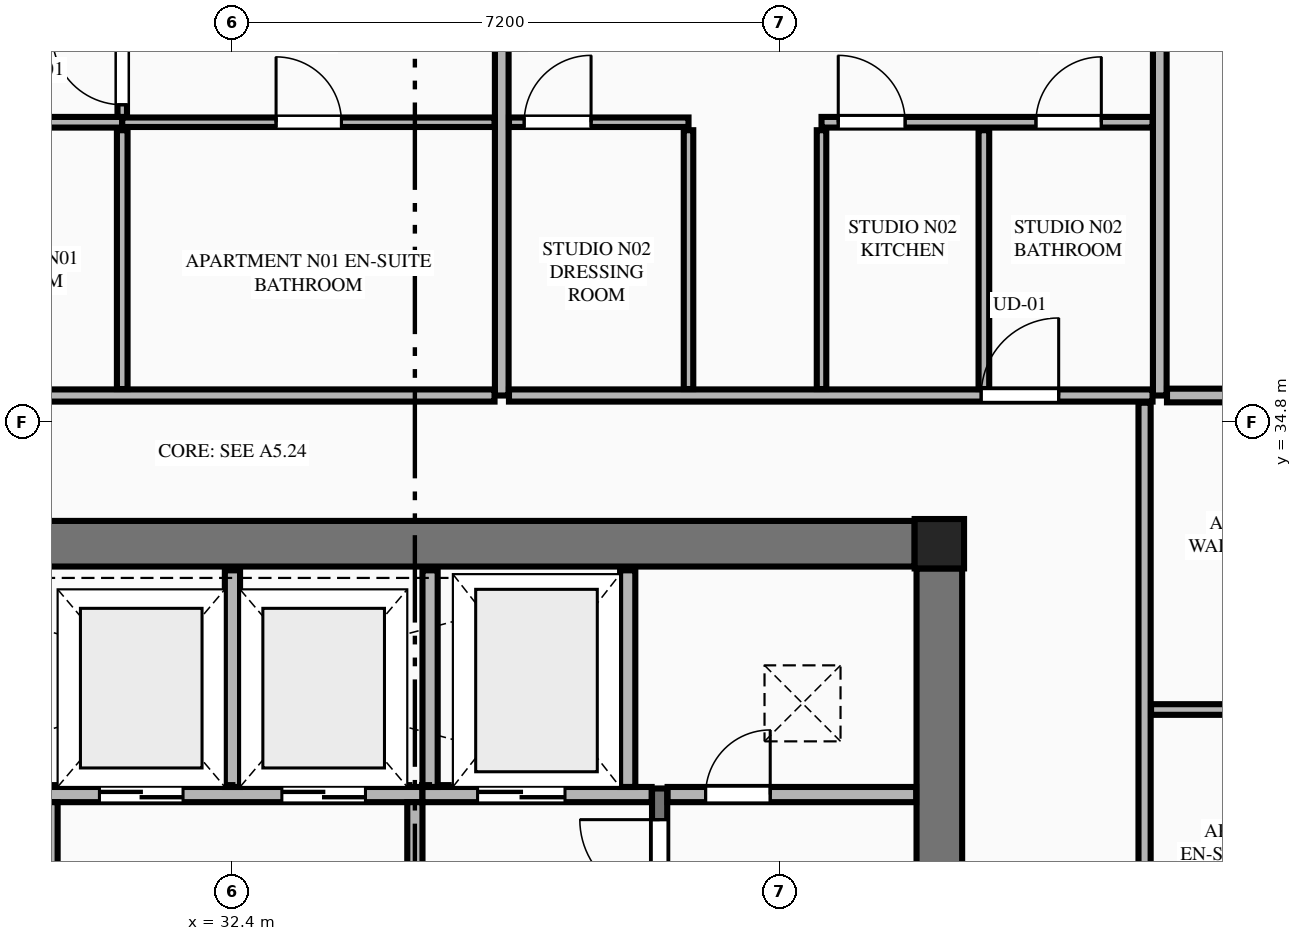
"""IFC4 building model, lengths in metres.
Left out: names, types, materials, properties, quantities, classifications, styles, units other than length and angle.
Written with IfcOpenShell. Run it as: python <this file> out.ifc"""

import sys

from ifc_helpers import new_model, si_unit, direction, frame, frame_2d, origin, origin_2d, place, context, subcontext, project, spatial, rectangle, extrude, element, fill, save


model = new_model("IFC4")
c1 = context("Model", 3, precision=1e-05, world=origin(), true_north=direction((0.0, 1.0)))
c2 = subcontext(c1, "Body", "Model", "MODEL_VIEW")
j1 = project(units=[si_unit("LENGTHUNIT", "METRE"), si_unit("PLANEANGLEUNIT", "RADIAN")], contexts=[c1])
p1 = place(None, origin())
s1 = spatial("IfcSite", under=j1, at=p1, CompositionType="ELEMENT")
p2 = place(p1, origin())
s2 = spatial("IfcBuilding", under=s1, at=p2, CompositionType="ELEMENT")
p3 = place(p2, frame((0.0, 0.0, 179.0)))
s3 = spatial("IfcBuildingStorey", under=s2, at=p3, CompositionType="ELEMENT", Elevation=179.0)
p4 = place(p3, frame((41.7, 33.2, 0.0), z_axis=(0.0, 0.0, 1.0), x_axis=(1.0, 0.0, 0.0)))
e1 = element("IfcColumn", 1, at=p4, inside=s3, PredefinedType="COLUMN", context=c2, shape_type="SweptSolid", body=[
    extrude(rectangle(XDim=0.65, YDim=0.65, at=origin_2d()), origin(), (0.0, 0.0, 1.0), 3.55),
])
p5 = place(p3, frame((23.425, 33.2, 0.0), z_axis=(0.0, 0.0, 1.0), x_axis=(1.0, 0.0, 0.0)))
e2 = element("IfcWall", 2, at=p5, inside=s3, PredefinedType="SHEAR", context=c2, shape_type="SweptSolid", body=[
    extrude(rectangle(XDim=17.95, YDim=0.6, at=frame_2d((8.975, 0.0))), origin(), (0.0, 0.0, 1.0), 3.35),
])
p6 = place(p3, frame((41.7, 18.925, 0.0), z_axis=(0.0, 0.0, 1.0), x_axis=(0.0, 1.0, 0.0)))
e3 = element("IfcWall", 3, at=p6, inside=s3, PredefinedType="SHEAR", context=c2, shape_type="SweptSolid", body=[
    extrude(rectangle(XDim=13.95, YDim=0.6, at=frame_2d((6.975, 0.0))), origin(), (0.0, 0.0, 1.0), 3.35),
])
p7 = place(p6, frame((2.915, 0.0, 0.0)))
e4 = element("IfcOpeningElement", 4, at=p7, cuts=e3, PredefinedType="OPENING", context=c2, shape_type="SweptSolid", body=[
    extrude(rectangle(XDim=1.22, YDim=2.25, at=frame_2d((0.61, 1.125))), frame((0.0, 0.31, 0.0), z_axis=(0.0, -1.0, 0.0), x_axis=(1.0, 0.0, 0.0)), (0.0, 0.0, 1.0), 0.62),
])
p8 = place(p3, frame((38.02, 23.2, 0.0), z_axis=(0.0, 0.0, 1.0), x_axis=(0.0, 1.0, 0.0)))
e5 = element("IfcWall", 5, at=p8, inside=s3, PredefinedType="SHEAR", context=c2, shape_type="SweptSolid", body=[
    extrude(rectangle(XDim=6.78, YDim=0.2, at=frame_2d((3.39, 0.0))), origin(), (0.0, 0.0, 1.0), 3.55),
])
p9 = place(p8, frame((5.32, 0.0, 0.0)))
e6 = element("IfcOpeningElement", 6, at=p9, cuts=e5, PredefinedType="OPENING", context=c2, shape_type="SweptSolid", body=[
    extrude(rectangle(XDim=1.05, YDim=2.15, at=frame_2d((0.525, 1.075))), frame((0.0, 0.11, 0.0), z_axis=(0.0, -1.0, 0.0), x_axis=(1.0, 0.0, 0.0)), (0.0, 0.0, 1.0), 0.22),
])
p10 = place(p3, frame((29.9, 29.9, 0.0), z_axis=(0.0, 0.0, 1.0), x_axis=(1.0, 0.0, 0.0)))
e7 = element("IfcWall", 7, at=p10, inside=s3, PredefinedType="PLUMBINGWALL", context=c2, shape_type="SweptSolid", body=[
    extrude(rectangle(XDim=5.0, YDim=0.2, at=frame_2d((2.5, 0.0))), origin(), (0.0, 0.0, 1.0), 3.35),
])
p11 = place(p10, frame((0.75, 0.0, 0.0)))
e8 = element("IfcOpeningElement", 8, at=p11, cuts=e7, PredefinedType="OPENING", context=c2, shape_type="SweptSolid", body=[
    extrude(rectangle(XDim=1.1, YDim=2.2, at=frame_2d((0.55, 1.1))), frame((0.0, 0.11, 0.0), z_axis=(0.0, -1.0, 0.0), x_axis=(1.0, 0.0, 0.0)), (0.0, 0.0, 1.0), 0.22),
])
p12 = place(p10, frame((3.15, 0.0, 0.0)))
e9 = element("IfcOpeningElement", 9, at=p12, cuts=e7, PredefinedType="OPENING", context=c2, shape_type="SweptSolid", body=[
    extrude(rectangle(XDim=1.1, YDim=2.2, at=frame_2d((0.55, 1.1))), frame((0.0, 0.11, 0.0), z_axis=(0.0, -1.0, 0.0), x_axis=(1.0, 0.0, 0.0)), (0.0, 0.0, 1.0), 0.22),
])
p13 = place(p3, frame((34.9, 29.9, 0.0), z_axis=(0.0, 0.0, 1.0), x_axis=(1.0, 0.0, 0.0)))
e10 = element("IfcWall", 10, at=p13, inside=s3, PredefinedType="PLUMBINGWALL", context=c2, shape_type="SweptSolid", body=[
    extrude(rectangle(XDim=3.015, YDim=0.2, at=frame_2d((1.508, 0.0))), origin(), (0.0, 0.0, 1.0), 3.35),
])
p14 = place(p13, frame((0.725, 0.0, 0.0)))
e11 = element("IfcOpeningElement", 11, at=p14, cuts=e10, PredefinedType="OPENING", context=c2, shape_type="SweptSolid", body=[
    extrude(rectangle(XDim=1.15, YDim=2.2, at=frame_2d((0.575, 1.1))), frame((0.0, 0.11, 0.0), z_axis=(0.0, -1.0, 0.0), x_axis=(1.0, 0.0, 0.0)), (0.0, 0.0, 1.0), 0.22),
])
p15 = place(p3, frame((38.125, 29.9, 0.0), z_axis=(0.0, 0.0, 1.0), x_axis=(1.0, 0.0, 0.0)))
e12 = element("IfcWall", 12, at=p15, inside=s3, PredefinedType="PLUMBINGWALL", context=c2, shape_type="SweptSolid", body=[
    extrude(rectangle(XDim=3.27, YDim=0.2, at=frame_2d((1.635, 0.0))), origin(), (0.0, 0.0, 1.0), 3.35),
])
p16 = place(p15, frame((0.5, 0.0, 0.0)))
e13 = element("IfcOpeningElement", 13, at=p16, cuts=e12, PredefinedType="OPENING", context=c2, shape_type="SweptSolid", body=[
    extrude(rectangle(XDim=0.85, YDim=2.05, at=frame_2d((0.425, 1.025))), frame((0.0, 0.11, 0.0), z_axis=(0.0, -1.0, 0.0), x_axis=(1.0, 0.0, 0.0)), (0.0, 0.0, 1.0), 0.22),
])
for number, where, z_axis, x_axis in (
    (14, (32.4, 30.0, 0.0), (0.0, 0.0, 1.0), (0.0, 1.0, 0.0)),
    (15, (35.0, 30.0, 0.0), (0.0, 0.0, 1.0), (0.0, 1.0, 0.0)),
    (16, (37.6, 30.0, 0.0), (0.0, 0.0, 1.0), (0.0, 1.0, 0.0)),
):
    element("IfcWall", number, at=place(p3, frame(where, z_axis=z_axis, x_axis=x_axis)), inside=s3, PredefinedType="PLUMBINGWALL", context=c2, shape_type="SweptSolid", body=[
        extrude(rectangle(XDim=2.85, YDim=0.2, at=frame_2d((1.425, 0.0))), origin(), (0.0, 0.0, 1.0), 3.35),
    ])
p17 = place(p3, frame((30.0, 27.05, 0.0), z_axis=(0.0, 0.0, 1.0), x_axis=(0.0, 1.0, 0.0)))
e17 = element("IfcWall", 17, at=p17, inside=s3, PredefinedType="PLUMBINGWALL", context=c2, shape_type="SweptSolid", body=[
    extrude(rectangle(XDim=2.75, YDim=0.2, at=frame_2d((1.375, 0.0))), origin(), (0.0, 0.0, 1.0), 3.35),
])
p18 = place(p17, frame((0.85, 0.0, 0.0)))
e18 = element("IfcOpeningElement", 18, at=p18, cuts=e17, PredefinedType="OPENING", context=c2, shape_type="SweptSolid", body=[
    extrude(rectangle(XDim=1.0, YDim=2.15, at=frame_2d((0.5, 1.075))), frame((0.0, 0.11, 0.0), z_axis=(0.0, -1.0, 0.0), x_axis=(1.0, 0.0, 0.0)), (0.0, 0.0, 1.0), 0.22),
])
p19 = place(p3, frame((34.8, 27.05, 0.0), z_axis=(0.0, 0.0, 1.0), x_axis=(0.0, 1.0, 0.0)))
e19 = element("IfcWall", 19, at=p19, inside=s3, PredefinedType="PLUMBINGWALL", context=c2, shape_type="SweptSolid", body=[
    extrude(rectangle(XDim=2.75, YDim=0.2, at=frame_2d((1.375, 0.0))), origin(), (0.0, 0.0, 1.0), 3.35),
])
p20 = place(p19, frame((0.85, 0.0, 0.0)))
e20 = element("IfcOpeningElement", 20, at=p20, cuts=e19, PredefinedType="OPENING", context=c2, shape_type="SweptSolid", body=[
    extrude(rectangle(XDim=1.0, YDim=2.15, at=frame_2d((0.5, 1.075))), frame((0.0, 0.11, 0.0), z_axis=(0.0, -1.0, 0.0), x_axis=(1.0, 0.0, 0.0)), (0.0, 0.0, 1.0), 0.22),
])
p21 = place(p3, frame((35.943, 35.15, 0.0), z_axis=(0.0, 0.0, 1.0), x_axis=(0.0, 1.0, 0.0)))
e21 = element("IfcWall", 21, at=p21, inside=s3, PredefinedType="PARTITIONING", context=c2, shape_type="SweptSolid", body=[
    extrude(rectangle(XDim=10.695, YDim=0.18, at=frame_2d((5.348, 0.0))), origin(), (0.0, 0.0, 1.0), 2.807),
])
p22 = place(p3, frame((44.6, 35.15, 0.0), z_axis=(0.0, 0.0, 1.0), x_axis=(0.0, 1.0, 0.0)))
e22 = element("IfcWall", 22, at=p22, inside=s3, PredefinedType="PARTITIONING", context=c2, shape_type="SweptSolid", body=[
    extrude(rectangle(XDim=10.482, YDim=0.18, at=frame_2d((5.241, 0.0))), origin(), (0.0, 0.0, 1.0), 3.35),
])
p23 = place(p3, frame((20.295, 35.15, 0.0), z_axis=(0.0, 0.0, 1.0), x_axis=(1.0, 0.0, 0.0)))
e23 = element("IfcWall", 23, at=p23, inside=s3, PredefinedType="PARTITIONING", context=c2, shape_type="SweptSolid", body=[
    extrude(rectangle(XDim=15.553, YDim=0.16, at=frame_2d((7.776, 0.0))), origin(), (0.0, 0.0, 1.0), 3.35),
])
p24 = place(p23, frame((0.405, 0.0, 0.0)))
e24 = element("IfcOpeningElement", 24, at=p24, cuts=e23, PredefinedType="OPENING", context=c2, shape_type="SweptSolid", body=[
    extrude(rectangle(XDim=1.02, YDim=2.25, at=frame_2d((0.51, 1.125))), frame((0.0, 0.09, 0.0), z_axis=(0.0, -1.0, 0.0), x_axis=(1.0, 0.0, 0.0)), (0.0, 0.0, 1.0), 0.18),
])
p25 = place(p3, frame((27.442, 38.745, 0.0), z_axis=(0.0, 0.0, 1.0), x_axis=(1.0, 0.0, 0.0)))
e25 = element("IfcWall", 25, at=p25, inside=s3, PredefinedType="PLUMBINGWALL", context=c2, shape_type="SweptSolid", body=[
    extrude(rectangle(XDim=3.508, YDim=0.14, at=frame_2d((1.754, 0.0))), origin(), (0.0, 0.0, 1.0), 3.35),
])
p26 = place(p25, frame((0.3, 0.0, 0.0)))
e26 = element("IfcOpeningElement", 26, at=p26, cuts=e25, PredefinedType="OPENING", context=c2, shape_type="SweptSolid", body=[
    extrude(rectangle(XDim=0.88, YDim=2.15, at=frame_2d((0.44, 1.075))), frame((0.0, 0.08, 0.0), z_axis=(0.0, -1.0, 0.0), x_axis=(1.0, 0.0, 0.0)), (0.0, 0.0, 1.0), 0.16),
])
p27 = place(p3, frame((30.95, 38.745, 0.0), z_axis=(0.0, 0.0, 1.0), x_axis=(1.0, 0.0, 0.0)))
e27 = element("IfcWall", 27, at=p27, inside=s3, PredefinedType="PARTITIONING", context=c2, shape_type="SweptSolid", body=[
    extrude(rectangle(XDim=4.898, YDim=0.125, at=frame_2d((2.449, 0.0))), origin(), (0.0, 0.0, 1.0), 3.35),
])
p28 = place(p27, frame((2.024, 0.0, 0.0)))
e28 = element("IfcOpeningElement", 28, at=p28, cuts=e27, PredefinedType="OPENING", context=c2, shape_type="SweptSolid", body=[
    extrude(rectangle(XDim=0.86, YDim=2.1, at=frame_2d((0.43, 1.05))), frame((0.0, 0.073, 0.0), z_axis=(0.0, -1.0, 0.0), x_axis=(1.0, 0.0, 0.0)), (0.0, 0.0, 1.0), 0.145),
])
p29 = place(p3, frame((30.95, 38.815, 0.0), z_axis=(0.0, 0.0, 1.0), x_axis=(0.0, 1.0, 0.0)))
e29 = element("IfcWall", 29, at=p29, inside=s3, PredefinedType="PARTITIONING", context=c2, shape_type="SweptSolid", body=[
    extrude(rectangle(XDim=1.33, YDim=0.125, at=frame_2d((0.665, 0.0))), origin(), (0.0, 0.0, 1.0), 3.35),
])
p30 = place(p29, frame((0.16, 0.0, 0.0)))
e30 = element("IfcOpeningElement", 30, at=p30, cuts=e29, PredefinedType="OPENING", context=c2, shape_type="SweptSolid", body=[
    extrude(rectangle(XDim=0.92, YDim=2.15, at=frame_2d((0.46, 1.075))), frame((0.0, 0.073, 0.0), z_axis=(0.0, -1.0, 0.0), x_axis=(1.0, 0.0, 0.0)), (0.0, 0.0, 1.0), 0.145),
])
p31 = place(p3, frame((30.95, 35.235, 0.0), z_axis=(0.0, 0.0, 1.0), x_axis=(0.0, 1.0, 0.0)))
e31 = element("IfcWall", 31, at=p31, inside=s3, PredefinedType="PLUMBINGWALL", context=c2, shape_type="SweptSolid", body=[
    extrude(rectangle(XDim=3.405, YDim=0.14, at=frame_2d((1.702, 0.0))), origin(), (0.0, 0.0, 1.0), 3.35),
])
p32 = place(p3, frame((36.038, 35.15, 0.0), z_axis=(0.0, 0.0, 1.0), x_axis=(1.0, 0.0, 0.0)))
e32 = element("IfcWall", 32, at=p32, inside=s3, PredefinedType="PARTITIONING", context=c2, shape_type="SweptSolid", body=[
    extrude(rectangle(XDim=8.467, YDim=0.16, at=frame_2d((4.233, 0.0))), origin(), (0.0, 0.0, 1.0), 3.35),
])
p33 = place(p32, frame((6.212, 0.0, 0.0)))
e33 = element("IfcOpeningElement", 33, at=p33, cuts=e32, PredefinedType="OPENING", context=c2, shape_type="SweptSolid", body=[
    extrude(rectangle(XDim=1.02, YDim=2.25, at=frame_2d((0.51, 1.125))), frame((0.0, 0.09, 0.0), z_axis=(0.0, -1.0, 0.0), x_axis=(1.0, 0.0, 0.0)), (0.0, 0.0, 1.0), 0.18),
])
p34 = place(p3, frame((40.15, 35.235, 0.0), z_axis=(0.0, 0.0, 1.0), x_axis=(0.0, 1.0, 0.0)))
e34 = element("IfcWall", 34, at=p34, inside=s3, PredefinedType="PARTITIONING", context=c2, shape_type="SweptSolid", body=[
    extrude(rectangle(XDim=3.405, YDim=0.125, at=frame_2d((1.702, 0.0))), origin(), (0.0, 0.0, 1.0), 3.35),
])
p35 = place(p3, frame((40.15, 38.745, 0.0), z_axis=(0.0, 0.0, 1.0), x_axis=(1.0, 0.0, 0.0)))
e35 = element("IfcWall", 35, at=p35, inside=s3, PredefinedType="PLUMBINGWALL", context=c2, shape_type="SweptSolid", body=[
    extrude(rectangle(XDim=4.355, YDim=0.14, at=frame_2d((2.177, 0.0))), origin(), (0.0, 0.0, 1.0), 3.35),
])
p36 = place(p35, frame((2.821, 0.0, 0.0)))
e36 = element("IfcOpeningElement", 36, at=p36, cuts=e35, PredefinedType="OPENING", context=c2, shape_type="SweptSolid", body=[
    extrude(rectangle(XDim=0.86, YDim=2.1, at=frame_2d((0.43, 1.05))), frame((0.0, 0.08, 0.0), z_axis=(0.0, -1.0, 0.0), x_axis=(1.0, 0.0, 0.0)), (0.0, 0.0, 1.0), 0.16),
])
p37 = place(p35, frame((0.22, 0.0, 0.0)))
e37 = element("IfcOpeningElement", 37, at=p37, cuts=e35, PredefinedType="OPENING", context=c2, shape_type="SweptSolid", body=[
    extrude(rectangle(XDim=0.88, YDim=2.15, at=frame_2d((0.44, 1.075))), frame((0.0, 0.08, 0.0), z_axis=(0.0, -1.0, 0.0), x_axis=(1.0, 0.0, 0.0)), (0.0, 0.0, 1.0), 0.16),
])
p38 = place(p3, frame((42.286, 35.235, 0.0), z_axis=(0.0, 0.0, 1.0), x_axis=(0.0, 1.0, 0.0)))
e38 = element("IfcWall", 38, at=p38, inside=s3, PredefinedType="PLUMBINGWALL", context=c2, shape_type="SweptSolid", body=[
    extrude(rectangle(XDim=3.405, YDim=0.14, at=frame_2d((1.702, 0.0))), origin(), (0.0, 0.0, 1.0), 2.807),
])
p39 = place(p3, frame((38.4, 35.235, 0.0), z_axis=(0.0, 0.0, 1.0), x_axis=(0.0, 1.0, 0.0)))
e39 = element("IfcWall", 39, at=p39, inside=s3, PredefinedType="PARTITIONING", context=c2, shape_type="SweptSolid", body=[
    extrude(rectangle(XDim=3.405, YDim=0.125, at=frame_2d((1.702, 0.0))), origin(), (0.0, 0.0, 1.0), 3.35),
])
p40 = place(p3, frame((36.038, 38.745, 0.0), z_axis=(0.0, 0.0, 1.0), x_axis=(1.0, 0.0, 0.0)))
e40 = element("IfcWall", 40, at=p40, inside=s3, PredefinedType="PARTITIONING", context=c2, shape_type="SweptSolid", body=[
    extrude(rectangle(XDim=2.362, YDim=0.125, at=frame_2d((1.181, 0.0))), origin(), (0.0, 0.0, 1.0), 3.35),
])
p41 = place(p40, frame((0.2, 0.0, 0.0)))
e41 = element("IfcOpeningElement", 41, at=p41, cuts=e40, PredefinedType="OPENING", context=c2, shape_type="SweptSolid", body=[
    extrude(rectangle(XDim=0.88, YDim=2.15, at=frame_2d((0.44, 1.075))), frame((0.0, 0.073, 0.0), z_axis=(0.0, -1.0, 0.0), x_axis=(1.0, 0.0, 0.0)), (0.0, 0.0, 1.0), 0.145),
])
p42 = place(p3, frame((44.695, 35.15, 0.0), z_axis=(0.0, 0.0, 1.0), x_axis=(1.0, 0.0, 0.0)))
e42 = element("IfcWall", 42, at=p42, inside=s3, PredefinedType="PARTITIONING", context=c2, shape_type="SweptSolid", body=[
    extrude(rectangle(XDim=5.995, YDim=0.18, at=frame_2d((2.998, 0.0))), origin(), (0.0, 0.0, 1.0), 3.35),
])
p43 = place(p3, frame((44.4, 16.345, 0.0), z_axis=(0.0, 0.0, 1.0), x_axis=(0.0, 1.0, 0.0)))
e43 = element("IfcWall", 43, at=p43, inside=s3, PredefinedType="PARTITIONING", context=c2, shape_type="SweptSolid", body=[
    extrude(rectangle(XDim=18.71, YDim=0.16, at=frame_2d((9.355, 0.0))), origin(), (0.0, 0.0, 1.0), 3.35),
])
p44 = place(p43, frame((0.45, 0.0, 0.0)))
e44 = element("IfcOpeningElement", 44, at=p44, cuts=e43, PredefinedType="OPENING", context=c2, shape_type="SweptSolid", body=[
    extrude(rectangle(XDim=1.02, YDim=2.25, at=frame_2d((0.51, 1.125))), frame((0.0, 0.09, 0.0), z_axis=(0.0, -1.0, 0.0), x_axis=(1.0, 0.0, 0.0)), (0.0, 0.0, 1.0), 0.18),
])
p45 = place(p3, frame((44.485, 31.019, 0.0), z_axis=(0.0, 0.0, 1.0), x_axis=(1.0, 0.0, 0.0)))
e45 = element("IfcWall", 45, at=p45, inside=s3, PredefinedType="PLUMBINGWALL", context=c2, shape_type="SweptSolid", body=[
    extrude(rectangle(XDim=3.68, YDim=0.14, at=frame_2d((1.84, 0.0))), origin(), (0.0, 0.0, 1.0), 3.35),
])
p46 = place(p9, origin())
e46 = element("IfcDoor", 46, at=p46, inside=s3, OperationType="SINGLE_SWING_RIGHT", PredefinedType="DOOR", context=c2, shape_type="SweptSolid", body=[
    extrude(rectangle(XDim=1.05, YDim=2.15, at=frame_2d((0.525, 1.075))), frame((0.0, 0.025, 0.0), z_axis=(0.0, -1.0, 0.0), x_axis=(1.0, 0.0, 0.0)), (0.0, 0.0, 1.0), 0.05),
])
fill(e6, e46)
p47 = place(p16, origin())
e47 = element("IfcDoor", 47, at=p47, inside=s3, OperationType="SINGLE_SWING_RIGHT", PredefinedType="DOOR", context=c2, shape_type="SweptSolid", body=[
    extrude(rectangle(XDim=0.85, YDim=2.05, at=frame_2d((0.425, 1.025))), frame((0.0, 0.025, 0.0), z_axis=(0.0, -1.0, 0.0), x_axis=(1.0, 0.0, 0.0)), (0.0, 0.0, 1.0), 0.05),
])
fill(e13, e47)
p48 = place(p14, origin())
e48 = element("IfcDoor", 48, at=p48, inside=s3, OperationType="DOUBLE_DOOR_SLIDING", PredefinedType="DOOR", context=c2, shape_type="SweptSolid", body=[
    extrude(rectangle(XDim=1.15, YDim=2.2, at=frame_2d((0.575, 1.1))), frame((0.0, 0.025, 0.0), z_axis=(0.0, -1.0, 0.0), x_axis=(1.0, 0.0, 0.0)), (0.0, 0.0, 1.0), 0.05),
])
fill(e11, e48)
p49 = place(p11, origin())
e49 = element("IfcDoor", 49, at=p49, inside=s3, OperationType="DOUBLE_DOOR_SLIDING", PredefinedType="DOOR", context=c2, shape_type="SweptSolid", body=[
    extrude(rectangle(XDim=1.1, YDim=2.2, at=frame_2d((0.55, 1.1))), frame((0.0, 0.025, 0.0), z_axis=(0.0, -1.0, 0.0), x_axis=(1.0, 0.0, 0.0)), (0.0, 0.0, 1.0), 0.05),
])
fill(e8, e49)
p50 = place(p12, origin())
e50 = element("IfcDoor", 50, at=p50, inside=s3, OperationType="DOUBLE_DOOR_SLIDING", PredefinedType="DOOR", context=c2, shape_type="SweptSolid", body=[
    extrude(rectangle(XDim=1.1, YDim=2.2, at=frame_2d((0.55, 1.1))), frame((0.0, 0.025, 0.0), z_axis=(0.0, -1.0, 0.0), x_axis=(1.0, 0.0, 0.0)), (0.0, 0.0, 1.0), 0.05),
])
fill(e9, e50)
p51 = place(p28, origin())
e51 = element("IfcDoor", 51, at=p51, inside=s3, OperationType="SINGLE_SWING_LEFT", PredefinedType="DOOR", context=c2, shape_type="SweptSolid", body=[
    extrude(rectangle(XDim=0.86, YDim=2.1, at=frame_2d((0.43, 1.05))), frame((0.0, 0.025, 0.0), z_axis=(0.0, -1.0, 0.0), x_axis=(1.0, 0.0, 0.0)), (0.0, 0.0, 1.0), 0.05),
])
fill(e28, e51)
p52 = place(p30, origin())
e52 = element("IfcDoor", 52, at=p52, inside=s3, OperationType="SINGLE_SWING_RIGHT", PredefinedType="DOOR", context=c2, shape_type="SweptSolid", body=[
    extrude(rectangle(XDim=0.92, YDim=2.15, at=frame_2d((0.46, 1.075))), frame((0.0, 0.025, 0.0), z_axis=(0.0, -1.0, 0.0), x_axis=(1.0, 0.0, 0.0)), (0.0, 0.0, 1.0), 0.05),
])
fill(e30, e52)
p53 = place(p41, origin())
e53 = element("IfcDoor", 53, at=p53, inside=s3, OperationType="SINGLE_SWING_RIGHT", PredefinedType="DOOR", context=c2, shape_type="SweptSolid", body=[
    extrude(rectangle(XDim=0.88, YDim=2.15, at=frame_2d((0.44, 1.075))), frame((0.0, 0.025, 0.0), z_axis=(0.0, -1.0, 0.0), x_axis=(1.0, 0.0, 0.0)), (0.0, 0.0, 1.0), 0.05),
])
fill(e41, e53)
p54 = place(p36, origin())
e54 = element("IfcDoor", 54, at=p54, inside=s3, OperationType="SINGLE_SWING_RIGHT", PredefinedType="DOOR", context=c2, shape_type="SweptSolid", body=[
    extrude(rectangle(XDim=0.86, YDim=2.1, at=frame_2d((0.43, 1.05))), frame((0.0, 0.025, 0.0), z_axis=(0.0, -1.0, 0.0), x_axis=(1.0, 0.0, 0.0)), (0.0, 0.0, 1.0), 0.05),
])
fill(e36, e54)
p55 = place(p33, origin())
e55 = element("IfcDoor", 55, at=p55, inside=s3, OperationType="SINGLE_SWING_RIGHT", PredefinedType="DOOR", context=c2, shape_type="SweptSolid", body=[
    extrude(rectangle(XDim=1.02, YDim=2.25, at=frame_2d((0.51, 1.125))), frame((0.0, 0.025, 0.0), z_axis=(0.0, -1.0, 0.0), x_axis=(1.0, 0.0, 0.0)), (0.0, 0.0, 1.0), 0.05),
])
fill(e33, e55)
p56 = place(p37, origin())
e56 = element("IfcDoor", 56, at=p56, inside=s3, OperationType="SINGLE_SWING_LEFT", PredefinedType="DOOR", context=c2, shape_type="SweptSolid", body=[
    extrude(rectangle(XDim=0.88, YDim=2.15, at=frame_2d((0.44, 1.075))), frame((0.0, 0.025, 0.0), z_axis=(0.0, -1.0, 0.0), x_axis=(1.0, 0.0, 0.0)), (0.0, 0.0, 1.0), 0.05),
])
fill(e37, e56)
save(model, sys.argv[1])
